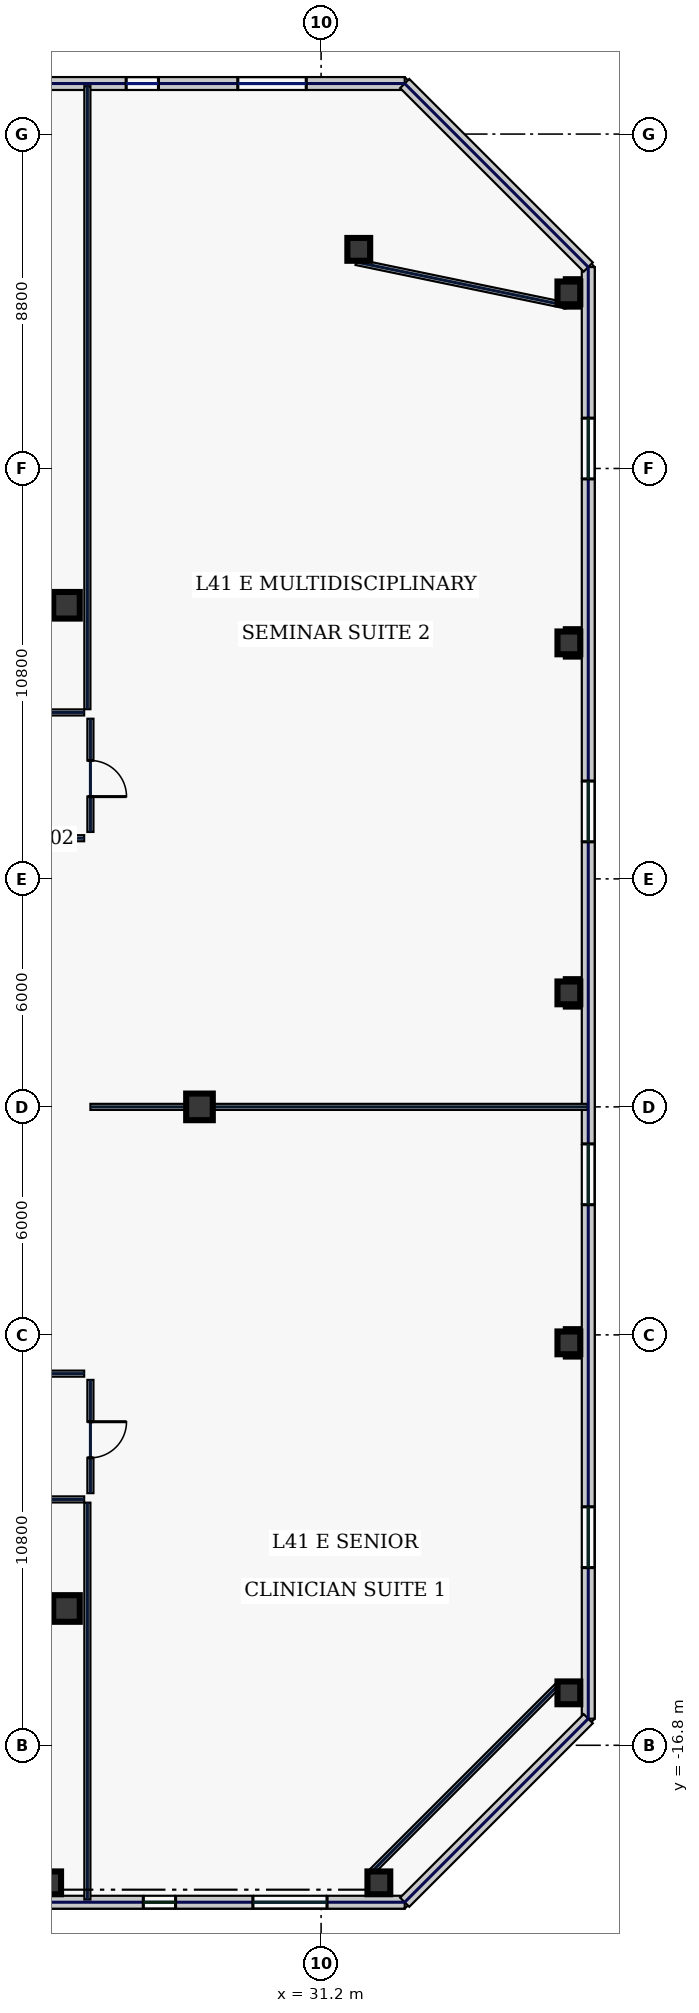
"""IFC4 building model, lengths in metres.
Left out: names, types, materials, properties, quantities, classifications, styles, units other than length and angle.
Written with IfcOpenShell. Run it as: python <this file> out.ifc"""

import sys

from ifc_helpers import new_model, si_unit, direction, frame, frame_2d, origin, origin_2d, place, context, subcontext, project, spatial, rectangle, hollow_rectangle, extrude, element, fill, save


model = new_model("IFC4")
c1 = context("Model", 3, precision=1e-05, world=origin(), true_north=direction((0.0, 1.0)))
c2 = subcontext(c1, "Body", "Model", "MODEL_VIEW")
j1 = project(units=[si_unit("LENGTHUNIT", "METRE"), si_unit("PLANEANGLEUNIT", "RADIAN")], contexts=[c1])
p1 = place(None, origin())
s1 = spatial("IfcSite", under=j1, at=p1, CompositionType="ELEMENT")
p2 = place(p1, origin())
s2 = spatial("IfcBuilding", under=s1, at=p2, CompositionType="ELEMENT")
p3 = place(p2, frame((0.0, 0.0, 180.2)))
s3 = spatial("IfcBuildingStorey", under=s2, at=p3, CompositionType="ELEMENT", Elevation=180.2)
for number, where, z_axis, x_axis in (
    (1, (24.5, -13.2, 0.0), (0.0, 0.0, 1.0), (1.0, 0.0, 0.0)),
    (2, (24.5, 13.2, 0.0), (0.0, 0.0, 1.0), (1.0, 0.0, 0.0)),
    (3, (28.0, 0.0, 0.0), (0.0, 0.0, 1.0), (1.0, 0.0, 0.0)),
):
    element("IfcColumn", number, at=place(p3, frame(where, z_axis=z_axis, x_axis=x_axis)), inside=s3, PredefinedType="COLUMN", context=c2, shape_type="SweptSolid", body=[
        extrude(hollow_rectangle(XDim=0.7, YDim=0.7, WallThickness=0.032, at=origin_2d()), origin(), (0.0, 0.0, 1.0), 3.74),
    ])
for number, where, z_axis, x_axis in (
    (4, (24.057, -20.42, 0.0), (0.0, 0.0, 1.0), (1.0, 0.0, 0.0)),
    (5, (32.72, -20.42, 0.0), (0.0, 0.0, 1.0), (1.0, 0.0, 0.0)),
    (6, (32.191, 22.566, 0.0), (0.0, 0.0, 1.0), (1.0, 0.0, 0.0)),
    (7, (37.72, -15.42, 0.0), (0.0, 0.0, 1.0), (1.0, 0.0, 0.0)),
    (8, (37.72, -6.21, 0.0), (0.0, 0.0, 1.0), (1.0, 0.0, 0.0)),
    (9, (37.72, 3.0, 0.0), (0.0, 0.0, 1.0), (1.0, 0.0, 0.0)),
    (10, (37.72, 12.21, 0.0), (0.0, 0.0, 1.0), (1.0, 0.0, 0.0)),
    (11, (37.72, 21.42, 0.0), (0.0, 0.0, 1.0), (1.0, 0.0, 0.0)),
):
    element("IfcColumn", number, at=place(p3, frame(where, z_axis=z_axis, x_axis=x_axis)), inside=s3, PredefinedType="COLUMN", context=c2, shape_type="SweptSolid", body=[
        extrude(hollow_rectangle(XDim=0.6, YDim=0.6, WallThickness=0.028, at=origin_2d()), origin(), (0.0, 0.0, 1.0), 3.74),
    ])
p4 = place(p3, frame((13.463, -20.93, 0.0), z_axis=(0.0, 0.0, 1.0), x_axis=(1.0, 0.0, 0.0)))
e12 = element("IfcWall", 12, at=p4, inside=s3, PredefinedType="STANDARD", context=c2, shape_type="SweptSolid", body=[
    extrude(rectangle(XDim=19.937, YDim=0.34, at=frame_2d((9.969, 0.0))), origin(), (0.0, 0.0, 1.0), 3.74),
])
p5 = place(p4, frame((3.295, 0.0, 0.8)))
e13 = element("IfcOpeningElement", 13, at=p5, cuts=e12, PredefinedType="OPENING", context=c2, shape_type="SweptSolid", body=[
    extrude(rectangle(XDim=0.85, YDim=1.85, at=frame_2d((0.425, 0.925))), frame((0.0, 0.18, 0.0), z_axis=(0.0, -1.0, 0.0), x_axis=(1.0, 0.0, 0.0)), (0.0, 0.0, 1.0), 0.36),
])
p6 = place(p4, frame((7.28, 0.0, 0.8)))
e14 = element("IfcOpeningElement", 14, at=p6, cuts=e12, PredefinedType="OPENING", context=c2, shape_type="SweptSolid", body=[
    extrude(rectangle(XDim=1.95, YDim=2.1, at=frame_2d((0.975, 1.05))), frame((0.0, 0.18, 0.0), z_axis=(0.0, -1.0, 0.0), x_axis=(1.0, 0.0, 0.0)), (0.0, 0.0, 1.0), 0.36),
])
p7 = place(p4, frame((13.058, 0.0, 0.8)))
e15 = element("IfcOpeningElement", 15, at=p7, cuts=e12, PredefinedType="OPENING", context=c2, shape_type="SweptSolid", body=[
    extrude(rectangle(XDim=0.85, YDim=1.85, at=frame_2d((0.425, 0.925))), frame((0.0, 0.18, 0.0), z_axis=(0.0, -1.0, 0.0), x_axis=(1.0, 0.0, 0.0)), (0.0, 0.0, 1.0), 0.36),
])
p8 = place(p4, frame((15.943, 0.0, 0.8)))
e16 = element("IfcOpeningElement", 16, at=p8, cuts=e12, PredefinedType="OPENING", context=c2, shape_type="SweptSolid", body=[
    extrude(rectangle(XDim=1.95, YDim=2.1, at=frame_2d((0.975, 1.05))), frame((0.0, 0.18, 0.0), z_axis=(0.0, -1.0, 0.0), x_axis=(1.0, 0.0, 0.0)), (0.0, 0.0, 1.0), 0.36),
])
p9 = place(p3, frame((33.4, 26.93, 0.0), z_axis=(0.0, 0.0, 1.0), x_axis=(-1.0, 0.0, 0.0)))
e17 = element("IfcWall", 17, at=p9, inside=s3, PredefinedType="STANDARD", context=c2, shape_type="SweptSolid", body=[
    extrude(rectangle(XDim=15.95, YDim=0.34, at=frame_2d((7.975, 0.0))), origin(), (0.0, 0.0, 1.0), 3.74),
])
p10 = place(p9, frame((11.071, 0.0, 0.7)))
e18 = element("IfcOpeningElement", 18, at=p10, cuts=e17, PredefinedType="OPENING", context=c2, shape_type="SweptSolid", body=[
    extrude(rectangle(XDim=0.85, YDim=1.85, at=frame_2d((0.425, 0.925))), frame((0.0, 0.18, 0.0), z_axis=(0.0, -1.0, 0.0), x_axis=(1.0, 0.0, 0.0)), (0.0, 0.0, 1.0), 0.36),
])
p11 = place(p9, frame((6.48, 0.0, 0.7)))
e19 = element("IfcOpeningElement", 19, at=p11, cuts=e17, PredefinedType="OPENING", context=c2, shape_type="SweptSolid", body=[
    extrude(rectangle(XDim=0.85, YDim=1.85, at=frame_2d((0.425, 0.925))), frame((0.0, 0.18, 0.0), z_axis=(0.0, -1.0, 0.0), x_axis=(1.0, 0.0, 0.0)), (0.0, 0.0, 1.0), 0.36),
])
p12 = place(p9, frame((2.591, 0.0, 0.7)))
e20 = element("IfcOpeningElement", 20, at=p12, cuts=e17, PredefinedType="OPENING", context=c2, shape_type="SweptSolid", body=[
    extrude(rectangle(XDim=1.8, YDim=2.2, at=frame_2d((0.9, 1.1))), frame((0.0, 0.18, 0.0), z_axis=(0.0, -1.0, 0.0), x_axis=(1.0, 0.0, 0.0)), (0.0, 0.0, 1.0), 0.36),
])
p13 = place(p3, frame((38.23, -16.1, 0.0), z_axis=(0.0, 0.0, 1.0), x_axis=(0.0, 1.0, 0.0)))
e21 = element("IfcWall", 21, at=p13, inside=s3, PredefinedType="STANDARD", context=c2, shape_type="SweptSolid", body=[
    extrude(rectangle(XDim=38.2, YDim=0.34, at=frame_2d((19.1, 0.0))), origin(), (0.0, 0.0, 1.0), 3.74),
])
p14 = place(p13, frame((3.975, 0.0, 0.58)))
e22 = element("IfcOpeningElement", 22, at=p14, cuts=e21, PredefinedType="OPENING", context=c2, shape_type="SweptSolid", body=[
    extrude(rectangle(XDim=1.6, YDim=2.3, at=frame_2d((0.8, 1.15))), frame((0.0, 0.18, 0.0), z_axis=(0.0, -1.0, 0.0), x_axis=(1.0, 0.0, 0.0)), (0.0, 0.0, 1.0), 0.36),
])
p15 = place(p13, frame((13.525, 0.0, 0.58)))
e23 = element("IfcOpeningElement", 23, at=p15, cuts=e21, PredefinedType="OPENING", context=c2, shape_type="SweptSolid", body=[
    extrude(rectangle(XDim=1.6, YDim=2.3, at=frame_2d((0.8, 1.15))), frame((0.0, 0.18, 0.0), z_axis=(0.0, -1.0, 0.0), x_axis=(1.0, 0.0, 0.0)), (0.0, 0.0, 1.0), 0.36),
])
p16 = place(p13, frame((23.075, 0.0, 0.58)))
e24 = element("IfcOpeningElement", 24, at=p16, cuts=e21, PredefinedType="OPENING", context=c2, shape_type="SweptSolid", body=[
    extrude(rectangle(XDim=1.6, YDim=2.3, at=frame_2d((0.8, 1.15))), frame((0.0, 0.18, 0.0), z_axis=(0.0, -1.0, 0.0), x_axis=(1.0, 0.0, 0.0)), (0.0, 0.0, 1.0), 0.36),
])
p17 = place(p13, frame((32.625, 0.0, 0.58)))
e25 = element("IfcOpeningElement", 25, at=p17, cuts=e21, PredefinedType="OPENING", context=c2, shape_type="SweptSolid", body=[
    extrude(rectangle(XDim=1.6, YDim=2.3, at=frame_2d((0.8, 1.15))), frame((0.0, 0.18, 0.0), z_axis=(0.0, -1.0, 0.0), x_axis=(1.0, 0.0, 0.0)), (0.0, 0.0, 1.0), 0.36),
])
for number, where, z_axis, x_axis in (
    (26, (33.4, -20.93, 0.0), (0.0, 0.0, 1.0), (0.707, 0.707, 0.0)),
    (27, (38.23, 22.1, 0.0), (0.0, 0.0, 1.0), (-0.707, 0.707, 0.0)),
):
    element("IfcWall", number, at=place(p3, frame(where, z_axis=z_axis, x_axis=x_axis)), inside=s3, PredefinedType="STANDARD", context=c2, shape_type="SweptSolid", body=[
        extrude(rectangle(XDim=6.831, YDim=0.34, at=frame_2d((3.415, 0.0))), origin(), (0.0, 0.0, 1.0), 3.74),
    ])
p18 = place(p3, frame((32.479, -20.18, 0.0), z_axis=(0.0, 0.0, 1.0), x_axis=(0.707106781187, 0.707106781187, 0.0)))
e28 = element("IfcWall", 28, at=p18, inside=s3, PredefinedType="PARTITIONING", context=c2, shape_type="SweptSolid", body=[
    extrude(rectangle(XDim=7.071, YDim=0.16, at=frame_2d((3.536, 0.0))), origin(), (0.0, 0.0, 1.0), 3.74),
])
p19 = place(p3, frame((37.651, 21.087, 0.0), z_axis=(0.0, 0.0, 1.0), x_axis=(-0.979184618318, 0.202971631636, 0.0)))
e29 = element("IfcWall", 29, at=p19, inside=s3, PredefinedType="PARTITIONING", context=c2, shape_type="SweptSolid", body=[
    extrude(rectangle(XDim=5.646, YDim=0.16, at=frame_2d((2.823, 0.0))), origin(), (0.0, 0.0, 1.0), 3.74),
])
p20 = place(p3, frame((-24.965, 10.38, 0.0), z_axis=(0.0, 0.0, 1.0), x_axis=(1.0, 0.0, 0.0)))
e30 = element("IfcWall", 30, at=p20, inside=s3, PredefinedType="PARTITIONING", context=c2, shape_type="SweptSolid", body=[
    extrude(rectangle(XDim=49.93, YDim=0.16, at=frame_2d((24.965, 0.0))), origin(), (0.0, 0.0, 1.0), 3.74),
])
p21 = place(p20, frame((2.044, 0.0, 0.0)))
e31 = element("IfcOpeningElement", 31, at=p21, cuts=e30, PredefinedType="OPENING", context=c2, shape_type="SweptSolid", body=[
    extrude(rectangle(XDim=1.15, YDim=2.2, at=frame_2d((0.575, 1.1))), frame((0.0, 0.09, 0.0), z_axis=(0.0, -1.0, 0.0), x_axis=(1.0, 0.0, 0.0)), (0.0, 0.0, 1.0), 0.18),
])
p22 = place(p20, frame((7.325, 0.0, 0.0)))
e32 = element("IfcOpeningElement", 32, at=p22, cuts=e30, PredefinedType="OPENING", context=c2, shape_type="SweptSolid", body=[
    extrude(rectangle(XDim=1.3, YDim=2.2, at=frame_2d((0.65, 1.1))), frame((0.0, 0.09, 0.0), z_axis=(0.0, -1.0, 0.0), x_axis=(1.0, 0.0, 0.0)), (0.0, 0.0, 1.0), 0.18),
])
p23 = place(p20, frame((13.525, 0.0, 0.0)))
e33 = element("IfcOpeningElement", 33, at=p23, cuts=e30, PredefinedType="OPENING", context=c2, shape_type="SweptSolid", body=[
    extrude(rectangle(XDim=1.3, YDim=2.2, at=frame_2d((0.65, 1.1))), frame((0.0, 0.09, 0.0), z_axis=(0.0, -1.0, 0.0), x_axis=(1.0, 0.0, 0.0)), (0.0, 0.0, 1.0), 0.18),
])
p24 = place(p20, frame((20.65, 0.0, 0.0)))
e34 = element("IfcOpeningElement", 34, at=p24, cuts=e30, PredefinedType="OPENING", context=c2, shape_type="SweptSolid", body=[
    extrude(rectangle(XDim=0.95, YDim=2.2, at=frame_2d((0.475, 1.1))), frame((0.0, 0.09, 0.0), z_axis=(0.0, -1.0, 0.0), x_axis=(1.0, 0.0, 0.0)), (0.0, 0.0, 1.0), 0.18),
])
p25 = place(p20, frame((28.175, 0.0, 0.0)))
e35 = element("IfcOpeningElement", 35, at=p25, cuts=e30, PredefinedType="OPENING", context=c2, shape_type="SweptSolid", body=[
    extrude(rectangle(XDim=1.45, YDim=2.2, at=frame_2d((0.725, 1.1))), frame((0.0, 0.09, 0.0), z_axis=(0.0, -1.0, 0.0), x_axis=(1.0, 0.0, 0.0)), (0.0, 0.0, 1.0), 0.18),
])
p26 = place(p20, frame((37.43, 0.0, 0.0)))
e36 = element("IfcOpeningElement", 36, at=p26, cuts=e30, PredefinedType="OPENING", context=c2, shape_type="SweptSolid", body=[
    extrude(rectangle(XDim=0.95, YDim=2.2, at=frame_2d((0.475, 1.1))), frame((0.0, 0.09, 0.0), z_axis=(0.0, -1.0, 0.0), x_axis=(1.0, 0.0, 0.0)), (0.0, 0.0, 1.0), 0.18),
])
p27 = place(p20, frame((42.37, 0.0, 0.0)))
e37 = element("IfcOpeningElement", 37, at=p27, cuts=e30, PredefinedType="OPENING", context=c2, shape_type="SweptSolid", body=[
    extrude(rectangle(XDim=0.95, YDim=2.2, at=frame_2d((0.475, 1.1))), frame((0.0, 0.09, 0.0), z_axis=(0.0, -1.0, 0.0), x_axis=(1.0, 0.0, 0.0)), (0.0, 0.0, 1.0), 0.18),
])
p28 = place(p20, frame((47.106, 0.0, 0.0)))
e38 = element("IfcOpeningElement", 38, at=p28, cuts=e30, PredefinedType="OPENING", context=c2, shape_type="SweptSolid", body=[
    extrude(rectangle(XDim=1.15, YDim=2.2, at=frame_2d((0.575, 1.1))), frame((0.0, 0.09, 0.0), z_axis=(0.0, -1.0, 0.0), x_axis=(1.0, 0.0, 0.0)), (0.0, 0.0, 1.0), 0.18),
])
p29 = place(p3, frame((25.13, 10.215, 0.0), z_axis=(0.0, 0.0, 1.0), x_axis=(0.0, -1.0, 0.0)))
e39 = element("IfcWall", 39, at=p29, inside=s3, PredefinedType="PARTITIONING", context=c2, shape_type="SweptSolid", body=[
    extrude(rectangle(XDim=2.98, YDim=0.16, at=frame_2d((1.49, 0.0))), origin(), (0.0, 0.0, 1.0), 3.74),
])
p30 = place(p29, frame((1.1, 0.0, 0.0)))
e40 = element("IfcOpeningElement", 40, at=p30, cuts=e39, PredefinedType="OPENING", context=c2, shape_type="SweptSolid", body=[
    extrude(rectangle(XDim=0.95, YDim=2.2, at=frame_2d((0.475, 1.1))), frame((0.0, 0.09, 0.0), z_axis=(0.0, -1.0, 0.0), x_axis=(1.0, 0.0, 0.0)), (0.0, 0.0, 1.0), 0.18),
])
for number, where, z_axis, x_axis in (
    (41, (24.965, 7.07, 0.0), (0.0, 0.0, 1.0), (-1.0, 0.0, 0.0)),
    (42, (10.715, -7.02, 0.0), (0.0, 0.0, 1.0), (1.0, 0.0, 0.0)),
):
    element("IfcWall", number, at=place(p3, frame(where, z_axis=z_axis, x_axis=x_axis)), inside=s3, PredefinedType="PARTITIONING", context=c2, shape_type="SweptSolid", body=[
        extrude(rectangle(XDim=14.25, YDim=0.16, at=frame_2d((7.125, 0.0))), origin(), (0.0, 0.0, 1.0), 3.74),
    ])
p31 = place(p3, frame((25.13, -7.185, 0.0), z_axis=(0.0, 0.0, 1.0), x_axis=(0.0, -1.0, 0.0)))
e43 = element("IfcWall", 43, at=p31, inside=s3, PredefinedType="PARTITIONING", context=c2, shape_type="SweptSolid", body=[
    extrude(rectangle(XDim=2.98, YDim=0.16, at=frame_2d((1.49, 0.0))), origin(), (0.0, 0.0, 1.0), 3.74),
])
p32 = place(p31, frame((1.1, 0.0, 0.0)))
e44 = element("IfcOpeningElement", 44, at=p32, cuts=e43, PredefinedType="OPENING", context=c2, shape_type="SweptSolid", body=[
    extrude(rectangle(XDim=0.95, YDim=2.2, at=frame_2d((0.475, 1.1))), frame((0.0, 0.09, 0.0), z_axis=(0.0, -1.0, 0.0), x_axis=(1.0, 0.0, 0.0)), (0.0, 0.0, 1.0), 0.18),
])
p33 = place(p3, frame((24.965, -10.33, 0.0), z_axis=(0.0, 0.0, 1.0), x_axis=(-1.0, 0.0, 0.0)))
e45 = element("IfcWall", 45, at=p33, inside=s3, PredefinedType="PARTITIONING", context=c2, shape_type="SweptSolid", body=[
    extrude(rectangle(XDim=49.93, YDim=0.16, at=frame_2d((24.965, 0.0))), origin(), (0.0, 0.0, 1.0), 3.74),
])
p34 = place(p33, frame((47.106, 0.0, 0.0)))
e46 = element("IfcOpeningElement", 46, at=p34, cuts=e45, PredefinedType="OPENING", context=c2, shape_type="SweptSolid", body=[
    extrude(rectangle(XDim=0.95, YDim=2.2, at=frame_2d((0.475, 1.1))), frame((0.0, 0.09, 0.0), z_axis=(0.0, -1.0, 0.0), x_axis=(1.0, 0.0, 0.0)), (0.0, 0.0, 1.0), 0.18),
])
p35 = place(p33, frame((40.075, 0.0, 0.0)))
e47 = element("IfcOpeningElement", 47, at=p35, cuts=e45, PredefinedType="OPENING", context=c2, shape_type="SweptSolid", body=[
    extrude(rectangle(XDim=1.05, YDim=2.2, at=frame_2d((0.525, 1.1))), frame((0.0, 0.09, 0.0), z_axis=(0.0, -1.0, 0.0), x_axis=(1.0, 0.0, 0.0)), (0.0, 0.0, 1.0), 0.18),
])
p36 = place(p33, frame((30.3, 0.0, 0.0)))
e48 = element("IfcOpeningElement", 48, at=p36, cuts=e45, PredefinedType="OPENING", context=c2, shape_type="SweptSolid", body=[
    extrude(rectangle(XDim=0.95, YDim=2.2, at=frame_2d((0.475, 1.1))), frame((0.0, 0.09, 0.0), z_axis=(0.0, -1.0, 0.0), x_axis=(1.0, 0.0, 0.0)), (0.0, 0.0, 1.0), 0.18),
])
p37 = place(p33, frame((20.375, 0.0, 0.0)))
e49 = element("IfcOpeningElement", 49, at=p37, cuts=e45, PredefinedType="OPENING", context=c2, shape_type="SweptSolid", body=[
    extrude(rectangle(XDim=1.3, YDim=2.2, at=frame_2d((0.65, 1.1))), frame((0.0, 0.09, 0.0), z_axis=(0.0, -1.0, 0.0), x_axis=(1.0, 0.0, 0.0)), (0.0, 0.0, 1.0), 0.18),
])
p38 = place(p33, frame((11.025, 0.0, 0.0)))
e50 = element("IfcOpeningElement", 50, at=p38, cuts=e45, PredefinedType="OPENING", context=c2, shape_type="SweptSolid", body=[
    extrude(rectangle(XDim=0.95, YDim=2.2, at=frame_2d((0.475, 1.1))), frame((0.0, 0.09, 0.0), z_axis=(0.0, -1.0, 0.0), x_axis=(1.0, 0.0, 0.0)), (0.0, 0.0, 1.0), 0.18),
])
p39 = place(p33, frame((3.144, 0.0, 0.0)))
e51 = element("IfcOpeningElement", 51, at=p39, cuts=e45, PredefinedType="OPENING", context=c2, shape_type="SweptSolid", body=[
    extrude(rectangle(XDim=0.95, YDim=2.2, at=frame_2d((0.475, 1.1))), frame((0.0, 0.09, 0.0), z_axis=(0.0, -1.0, 0.0), x_axis=(1.0, 0.0, 0.0)), (0.0, 0.0, 1.0), 0.18),
])
p40 = place(p3, frame((25.05, 10.465, 0.0), z_axis=(0.0, 0.0, 1.0), x_axis=(0.0, 1.0, 0.0)))
e52 = element("IfcWall", 52, at=p40, inside=s3, PredefinedType="PARTITIONING", context=c2, shape_type="SweptSolid", body=[
    extrude(rectangle(XDim=16.395, YDim=0.16, at=frame_2d((8.198, 0.0))), origin(), (0.0, 0.0, 1.0), 3.74),
])
p41 = place(p3, frame((25.05, -20.86, 0.0), z_axis=(0.0, 0.0, 1.0), x_axis=(0.0, 1.0, 0.0)))
e53 = element("IfcWall", 53, at=p41, inside=s3, PredefinedType="PARTITIONING", context=c2, shape_type="SweptSolid", body=[
    extrude(rectangle(XDim=10.445, YDim=0.16, at=frame_2d((5.223, 0.0))), origin(), (0.0, 0.0, 1.0), 3.74),
])
p42 = place(p3, frame((25.13, 0.0, 0.0), z_axis=(0.0, 0.0, 1.0), x_axis=(1.0, 0.0, 0.0)))
e54 = element("IfcWall", 54, at=p42, inside=s3, PredefinedType="PARTITIONING", context=c2, shape_type="SweptSolid", body=[
    extrude(rectangle(XDim=13.08, YDim=0.16, at=frame_2d((6.54, 0.0))), origin(), (0.0, 0.0, 1.0), 3.285),
])
p43 = place(p7, origin())
e55 = element("IfcWindow", 55, at=p43, inside=s3, PartitioningType="SINGLE_PANEL", PredefinedType="WINDOW", context=c2, shape_type="SweptSolid", body=[
    extrude(rectangle(XDim=0.85, YDim=1.85, at=frame_2d((0.425, 0.925))), frame((0.0, 0.03, 0.0), z_axis=(0.0, -1.0, 0.0), x_axis=(1.0, 0.0, 0.0)), (0.0, 0.0, 1.0), 0.06),
])
fill(e15, e55)
p44 = place(p8, origin())
e56 = element("IfcWindow", 56, at=p44, inside=s3, PartitioningType="SINGLE_PANEL", PredefinedType="WINDOW", context=c2, shape_type="SweptSolid", body=[
    extrude(rectangle(XDim=1.95, YDim=2.1, at=frame_2d((0.975, 1.05))), frame((0.0, 0.03, 0.0), z_axis=(0.0, -1.0, 0.0), x_axis=(1.0, 0.0, 0.0)), (0.0, 0.0, 1.0), 0.06),
])
fill(e16, e56)
p45 = place(p11, origin())
e57 = element("IfcWindow", 57, at=p45, inside=s3, PartitioningType="SINGLE_PANEL", PredefinedType="WINDOW", context=c2, shape_type="SweptSolid", body=[
    extrude(rectangle(XDim=0.85, YDim=1.85, at=frame_2d((0.425, 0.925))), frame((0.0, 0.03, 0.0), z_axis=(0.0, -1.0, 0.0), x_axis=(1.0, 0.0, 0.0)), (0.0, 0.0, 1.0), 0.06),
])
fill(e19, e57)
p46 = place(p12, origin())
e58 = element("IfcWindow", 58, at=p46, inside=s3, PartitioningType="SINGLE_PANEL", PredefinedType="WINDOW", context=c2, shape_type="SweptSolid", body=[
    extrude(rectangle(XDim=1.8, YDim=2.2, at=frame_2d((0.9, 1.1))), frame((0.0, 0.03, 0.0), z_axis=(0.0, -1.0, 0.0), x_axis=(1.0, 0.0, 0.0)), (0.0, 0.0, 1.0), 0.06),
])
fill(e20, e58)
p47 = place(p14, origin())
e59 = element("IfcWindow", 59, at=p47, inside=s3, PartitioningType="SINGLE_PANEL", PredefinedType="WINDOW", context=c2, shape_type="SweptSolid", body=[
    extrude(rectangle(XDim=1.6, YDim=2.3, at=frame_2d((0.8, 1.15))), frame((0.0, 0.03, 0.0), z_axis=(0.0, -1.0, 0.0), x_axis=(1.0, 0.0, 0.0)), (0.0, 0.0, 1.0), 0.06),
])
fill(e22, e59)
p48 = place(p15, origin())
e60 = element("IfcWindow", 60, at=p48, inside=s3, PartitioningType="SINGLE_PANEL", PredefinedType="WINDOW", context=c2, shape_type="SweptSolid", body=[
    extrude(rectangle(XDim=1.6, YDim=2.3, at=frame_2d((0.8, 1.15))), frame((0.0, 0.03, 0.0), z_axis=(0.0, -1.0, 0.0), x_axis=(1.0, 0.0, 0.0)), (0.0, 0.0, 1.0), 0.06),
])
fill(e23, e60)
p49 = place(p16, origin())
e61 = element("IfcWindow", 61, at=p49, inside=s3, PartitioningType="SINGLE_PANEL", PredefinedType="WINDOW", context=c2, shape_type="SweptSolid", body=[
    extrude(rectangle(XDim=1.6, YDim=2.3, at=frame_2d((0.8, 1.15))), frame((0.0, 0.03, 0.0), z_axis=(0.0, -1.0, 0.0), x_axis=(1.0, 0.0, 0.0)), (0.0, 0.0, 1.0), 0.06),
])
fill(e24, e61)
p50 = place(p17, origin())
e62 = element("IfcWindow", 62, at=p50, inside=s3, PartitioningType="SINGLE_PANEL", PredefinedType="WINDOW", context=c2, shape_type="SweptSolid", body=[
    extrude(rectangle(XDim=1.6, YDim=2.3, at=frame_2d((0.8, 1.15))), frame((0.0, 0.03, 0.0), z_axis=(0.0, -1.0, 0.0), x_axis=(1.0, 0.0, 0.0)), (0.0, 0.0, 1.0), 0.06),
])
fill(e25, e62)
p51 = place(p32, origin())
e63 = element("IfcDoor", 63, at=p51, inside=s3, OperationType="SINGLE_SWING_LEFT", PredefinedType="DOOR", context=c2, shape_type="SweptSolid", body=[
    extrude(rectangle(XDim=0.95, YDim=2.2, at=frame_2d((0.475, 1.1))), frame((0.0, 0.025, 0.0), z_axis=(0.0, -1.0, 0.0), x_axis=(1.0, 0.0, 0.0)), (0.0, 0.0, 1.0), 0.05),
])
fill(e44, e63)
p52 = place(p30, origin())
e64 = element("IfcDoor", 64, at=p52, inside=s3, OperationType="SINGLE_SWING_RIGHT", PredefinedType="DOOR", context=c2, shape_type="SweptSolid", body=[
    extrude(rectangle(XDim=0.95, YDim=2.2, at=frame_2d((0.475, 1.1))), frame((0.0, 0.025, 0.0), z_axis=(0.0, -1.0, 0.0), x_axis=(1.0, 0.0, 0.0)), (0.0, 0.0, 1.0), 0.05),
])
fill(e40, e64)
save(model, sys.argv[1])
